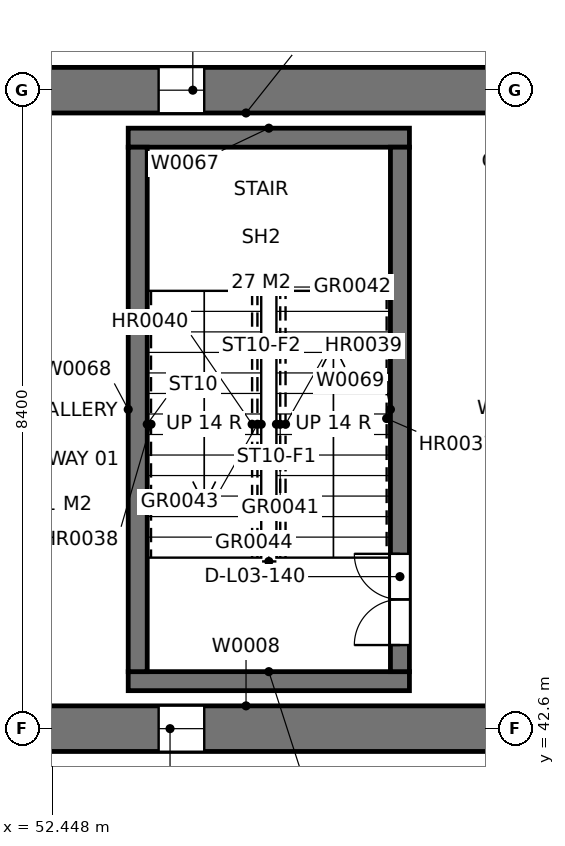
"""IFC4 building model, lengths in metres.
Left out: names, types, materials, properties, quantities, classifications, styles, units other than length and angle.
Written with IfcOpenShell. Run it as: python <this file> out.ifc"""

import sys

from ifc_helpers import new_model, si_unit, direction, frame, frame_2d, origin, place, context, subcontext, project, spatial, rectangle, extrude, element, fill, save


model = new_model("IFC4")
c1 = context("Model", 3, precision=1e-05, world=origin(), true_north=direction((0.0, 1.0)))
c2 = subcontext(c1, "Body", "Model", "MODEL_VIEW")
j1 = project(units=[si_unit("LENGTHUNIT", "METRE"), si_unit("PLANEANGLEUNIT", "RADIAN")], contexts=[c1])
p1 = place(None, origin())
s1 = spatial("IfcSite", under=j1, at=p1, CompositionType="ELEMENT")
p2 = place(p1, origin())
s2 = spatial("IfcBuilding", under=s1, at=p2, CompositionType="ELEMENT")
p3 = place(p2, frame((0.0, 0.0, 14.4)))
s3 = spatial("IfcBuildingStorey", under=s2, at=p3, CompositionType="ELEMENT", Elevation=14.4)
p4 = place(p3, frame((51.3, 42.6, 0.0), z_axis=(0.0, 0.0, 1.0), x_axis=(1.0, 0.0, 0.0)))
e1 = element("IfcWall", 1, at=p4, inside=s3, PredefinedType="SOLIDWALL", context=c2, shape_type="SweptSolid", body=[
    extrude(rectangle(XDim=7.4, YDim=0.6, at=frame_2d((3.7, 0.0))), origin(), (0.0, 0.0, 1.0), 4.8),
])
p5 = place(p4, frame((2.55, 0.0, 1.5)))
e2 = element("IfcOpeningElement", 2, at=p5, cuts=e1, PredefinedType="OPENING", context=c2, shape_type="SweptSolid", body=[
    extrude(rectangle(XDim=0.6, YDim=1.8, at=frame_2d((0.3, 0.9))), frame((0.0, 0.31, 0.0), z_axis=(0.0, -1.0, 0.0), x_axis=(1.0, 0.0, 0.0)), (0.0, 0.0, 1.0), 0.62),
])
p6 = place(p3, frame((58.7, 51.0, 0.0), z_axis=(0.0, 0.0, 1.0), x_axis=(-1.0, 0.0, 0.0)))
e3 = element("IfcWall", 3, at=p6, inside=s3, PredefinedType="SOLIDWALL", context=c2, shape_type="SweptSolid", body=[
    extrude(rectangle(XDim=7.4, YDim=0.6, at=frame_2d((3.7, 0.0))), origin(), (0.0, 0.0, 1.0), 4.8),
])
p7 = place(p6, frame((4.25, 0.0, 1.5)))
e4 = element("IfcOpeningElement", 4, at=p7, cuts=e3, PredefinedType="OPENING", context=c2, shape_type="SweptSolid", body=[
    extrude(rectangle(XDim=0.6, YDim=1.8, at=frame_2d((0.3, 0.9))), frame((0.0, 0.31, 0.0), z_axis=(0.0, -1.0, 0.0), x_axis=(1.0, 0.0, 0.0)), (0.0, 0.0, 1.0), 0.62),
])
for number, where, z_axis, x_axis in (
    (5, (53.45, 43.225, 0.0), (0.0, 0.0, 1.0), (1.0, 0.0, 0.0)),
    (6, (53.45, 50.375, 0.0), (0.0, 0.0, 1.0), (1.0, 0.0, 0.0)),
):
    element("IfcWall", number, at=place(p3, frame(where, z_axis=z_axis, x_axis=x_axis)), inside=s3, PredefinedType="SOLIDWALL", context=c2, shape_type="SweptSolid", body=[
        extrude(rectangle(XDim=3.7, YDim=0.25, at=frame_2d((1.85, 0.0))), origin(), (0.0, 0.0, 1.0), 4.8),
    ])
p8 = place(p3, frame((53.575, 43.35, 0.0), z_axis=(0.0, 0.0, 1.0), x_axis=(0.0, 1.0, 0.0)))
e7 = element("IfcWall", 7, at=p8, inside=s3, PredefinedType="SOLIDWALL", context=c2, shape_type="SweptSolid", body=[
    extrude(rectangle(XDim=6.9, YDim=0.25, at=frame_2d((3.45, 0.0))), origin(), (0.0, 0.0, 1.0), 4.8),
])
p9 = place(p3, frame((57.025, 43.35, 0.0), z_axis=(0.0, 0.0, 1.0), x_axis=(0.0, 1.0, 0.0)))
e8 = element("IfcWall", 8, at=p9, inside=s3, PredefinedType="SOLIDWALL", context=c2, shape_type="SweptSolid", body=[
    extrude(rectangle(XDim=6.9, YDim=0.25, at=frame_2d((3.45, 0.0))), origin(), (0.0, 0.0, 1.0), 4.8),
])
p10 = place(p9, frame((0.35, 0.0, 0.0)))
e9 = element("IfcOpeningElement", 9, at=p10, cuts=e8, PredefinedType="OPENING", context=c2, shape_type="SweptSolid", body=[
    extrude(rectangle(XDim=1.2, YDim=2.1, at=frame_2d((0.6, 1.05))), frame((0.0, 0.135, 0.0), z_axis=(0.0, -1.0, 0.0), x_axis=(1.0, 0.0, 0.0)), (0.0, 0.0, 1.0), 0.27),
])
p11 = place(p10, origin())
e10 = element("IfcDoor", 10, at=p11, inside=s3, OperationType="DOUBLE_DOOR_SINGLE_SWING", PredefinedType="DOOR", context=c2, shape_type="SweptSolid", body=[
    extrude(rectangle(XDim=1.2, YDim=2.1, at=frame_2d((0.6, 1.05))), frame((0.0, 0.025, 0.0), z_axis=(0.0, -1.0, 0.0), x_axis=(1.0, 0.0, 0.0)), (0.0, 0.0, 1.0), 0.05),
])
fill(e9, e10)
p12 = place(p5, origin())
e11 = element("IfcWindow", 11, at=p12, inside=s3, PartitioningType="SINGLE_PANEL", PredefinedType="WINDOW", context=c2, shape_type="SweptSolid", body=[
    extrude(rectangle(XDim=0.6, YDim=1.8, at=frame_2d((0.3, 0.9))), frame((0.0, 0.01, 0.0), z_axis=(0.0, -1.0, 0.0), x_axis=(1.0, 0.0, 0.0)), (0.0, 0.0, 1.0), 0.06),
])
fill(e2, e11)
p13 = place(p7, origin())
e12 = element("IfcWindow", 12, at=p13, inside=s3, PartitioningType="SINGLE_PANEL", PredefinedType="WINDOW", context=c2, shape_type="SweptSolid", body=[
    extrude(rectangle(XDim=0.6, YDim=1.8, at=frame_2d((0.3, 0.9))), frame((0.0, 0.01, 0.0), z_axis=(0.0, -1.0, 0.0), x_axis=(1.0, 0.0, 0.0)), (0.0, 0.0, 1.0), 0.06),
])
fill(e4, e12)
save(model, sys.argv[1])
